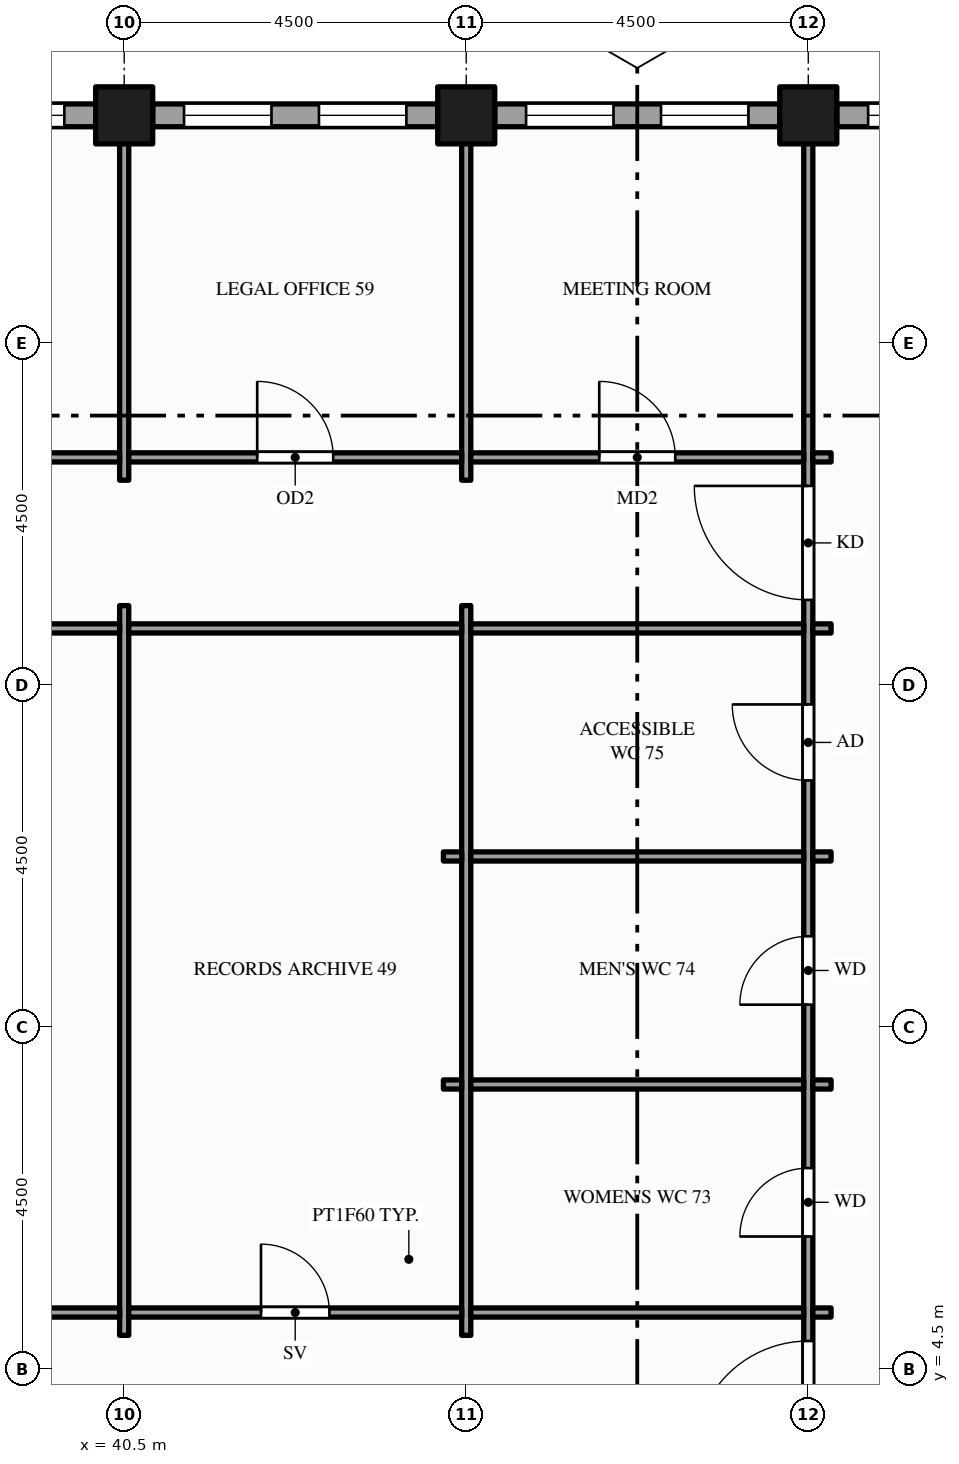
"""IFC4 building model, lengths in metres.
Left out: names, types, materials, properties, quantities, classifications, styles, units other than length and angle.
Written with IfcOpenShell. Run it as: python <this file> out.ifc"""

import sys

from ifc_helpers import new_model, si_unit, direction, frame, frame_2d, origin, origin_2d, place, context, subcontext, project, spatial, rectangle, hollow_rectangle, extrude, element, fill, save


model = new_model("IFC4")
c1 = context("Model", 3, precision=1e-05, world=origin(), true_north=direction((0.0, 1.0)))
c2 = subcontext(c1, "Body", "Model", "MODEL_VIEW")
j1 = project(units=[si_unit("LENGTHUNIT", "METRE"), si_unit("PLANEANGLEUNIT", "RADIAN")], contexts=[c1])
p1 = place(None, origin())
s1 = spatial("IfcSite", under=j1, at=p1, CompositionType="ELEMENT")
p2 = place(p1, origin())
s2 = spatial("IfcBuilding", under=s1, at=p2, CompositionType="ELEMENT")
p3 = place(p2, frame((0.0, 0.0, 199.0)))
s3 = spatial("IfcBuildingStorey", under=s2, at=p3, CompositionType="ELEMENT", Elevation=199.0)
for number, where, z_axis, x_axis in (
    (1, (40.5, 21.0, -0.15), (0.0, 0.0, 1.0), (1.0, 0.0, 0.0)),
    (2, (45.0, 21.0, -0.15), (0.0, 0.0, 1.0), (1.0, 0.0, 0.0)),
    (3, (49.5, 21.0, -0.15), (0.0, 0.0, 1.0), (1.0, 0.0, 0.0)),
):
    element("IfcColumn", number, at=place(p3, frame(where, z_axis=z_axis, x_axis=x_axis)), inside=s3, PredefinedType="COLUMN", context=c2, shape_type="SweptSolid", body=[
        extrude(hollow_rectangle(XDim=0.75, YDim=0.75, WallThickness=0.036, at=origin_2d()), origin(), (0.0, 0.0, 1.0), 4.0),
    ])
p4 = place(p3, frame((54.0, 21.0, 0.0), z_axis=(0.0, 0.0, 1.0), x_axis=(-1.0, 0.0, 0.0)))
e4 = element("IfcWall", 4, at=p4, inside=s3, PredefinedType="STANDARD", context=c2, shape_type="SweptSolid", body=[
    extrude(rectangle(XDim=4.125, YDim=0.3, at=frame_2d((2.062, 0.0))), origin(), (0.0, 0.0, 1.0), 2.87),
])
p5 = place(p4, frame((0.4, 0.0, 0.9)))
e5 = element("IfcOpeningElement", 5, at=p5, cuts=e4, PredefinedType="OPENING", context=c2, shape_type="SweptSolid", body=[
    extrude(rectangle(XDim=1.55, YDim=1.75, at=frame_2d((0.775, 0.875))), frame((0.0, 0.16, 0.0), z_axis=(0.0, -1.0, 0.0), x_axis=(1.0, 0.0, 0.0)), (0.0, 0.0, 1.0), 0.32),
])
p6 = place(p4, frame((2.562, 0.0, 0.9)))
e6 = element("IfcOpeningElement", 6, at=p6, cuts=e4, PredefinedType="OPENING", context=c2, shape_type="SweptSolid", body=[
    extrude(rectangle(XDim=1.15, YDim=1.75, at=frame_2d((0.575, 0.875))), frame((0.0, 0.16, 0.0), z_axis=(0.0, -1.0, 0.0), x_axis=(1.0, 0.0, 0.0)), (0.0, 0.0, 1.0), 0.32),
])
p7 = place(p3, frame((49.125, 21.0, 0.0), z_axis=(0.0, 0.0, 1.0), x_axis=(-1.0, 0.0, 0.0)))
e7 = element("IfcWall", 7, at=p7, inside=s3, PredefinedType="STANDARD", context=c2, shape_type="SweptSolid", body=[
    extrude(rectangle(XDim=3.75, YDim=0.3, at=frame_2d((1.875, 0.0))), origin(), (0.0, 0.0, 1.0), 2.87),
])
p8 = place(p7, frame((0.413, 0.0, 0.9)))
e8 = element("IfcOpeningElement", 8, at=p8, cuts=e7, PredefinedType="OPENING", context=c2, shape_type="SweptSolid", body=[
    extrude(rectangle(XDim=1.15, YDim=1.75, at=frame_2d((0.575, 0.875))), frame((0.0, 0.16, 0.0), z_axis=(0.0, -1.0, 0.0), x_axis=(1.0, 0.0, 0.0)), (0.0, 0.0, 1.0), 0.32),
])
p9 = place(p7, frame((2.188, 0.0, 0.9)))
e9 = element("IfcOpeningElement", 9, at=p9, cuts=e7, PredefinedType="OPENING", context=c2, shape_type="SweptSolid", body=[
    extrude(rectangle(XDim=1.15, YDim=1.75, at=frame_2d((0.575, 0.875))), frame((0.0, 0.16, 0.0), z_axis=(0.0, -1.0, 0.0), x_axis=(1.0, 0.0, 0.0)), (0.0, 0.0, 1.0), 0.32),
])
p10 = place(p3, frame((44.625, 21.0, 0.0), z_axis=(0.0, 0.0, 1.0), x_axis=(-1.0, 0.0, 0.0)))
e10 = element("IfcWall", 10, at=p10, inside=s3, PredefinedType="STANDARD", context=c2, shape_type="SweptSolid", body=[
    extrude(rectangle(XDim=3.75, YDim=0.3, at=frame_2d((1.875, 0.0))), origin(), (0.0, 0.0, 1.0), 2.87),
])
p11 = place(p10, frame((0.413, 0.0, 0.9)))
e11 = element("IfcOpeningElement", 11, at=p11, cuts=e10, PredefinedType="OPENING", context=c2, shape_type="SweptSolid", body=[
    extrude(rectangle(XDim=1.15, YDim=1.75, at=frame_2d((0.575, 0.875))), frame((0.0, 0.16, 0.0), z_axis=(0.0, -1.0, 0.0), x_axis=(1.0, 0.0, 0.0)), (0.0, 0.0, 1.0), 0.32),
])
p12 = place(p10, frame((2.188, 0.0, 0.9)))
e12 = element("IfcOpeningElement", 12, at=p12, cuts=e10, PredefinedType="OPENING", context=c2, shape_type="SweptSolid", body=[
    extrude(rectangle(XDim=1.15, YDim=1.75, at=frame_2d((0.575, 0.875))), frame((0.0, 0.16, 0.0), z_axis=(0.0, -1.0, 0.0), x_axis=(1.0, 0.0, 0.0)), (0.0, 0.0, 1.0), 0.32),
])
p13 = place(p3, frame((40.125, 21.0, 0.0), z_axis=(0.0, 0.0, 1.0), x_axis=(-1.0, 0.0, 0.0)))
e13 = element("IfcWall", 13, at=p13, inside=s3, PredefinedType="STANDARD", context=c2, shape_type="SweptSolid", body=[
    extrude(rectangle(XDim=3.75, YDim=0.3, at=frame_2d((1.875, 0.0))), origin(), (0.0, 0.0, 1.0), 2.87),
])
p14 = place(p13, frame((0.413, 0.0, 0.9)))
e14 = element("IfcOpeningElement", 14, at=p14, cuts=e13, PredefinedType="OPENING", context=c2, shape_type="SweptSolid", body=[
    extrude(rectangle(XDim=1.15, YDim=1.75, at=frame_2d((0.575, 0.875))), frame((0.0, 0.16, 0.0), z_axis=(0.0, -1.0, 0.0), x_axis=(1.0, 0.0, 0.0)), (0.0, 0.0, 1.0), 0.32),
])
p15 = place(p13, frame((2.188, 0.0, 0.9)))
e15 = element("IfcOpeningElement", 15, at=p15, cuts=e13, PredefinedType="OPENING", context=c2, shape_type="SweptSolid", body=[
    extrude(rectangle(XDim=1.15, YDim=1.75, at=frame_2d((0.575, 0.875))), frame((0.0, 0.16, 0.0), z_axis=(0.0, -1.0, 0.0), x_axis=(1.0, 0.0, 0.0)), (0.0, 0.0, 1.0), 0.32),
])
p16 = place(p3, frame((40.5, 4.95, 0.0), z_axis=(0.0, 0.0, 1.0), x_axis=(0.0, 1.0, 0.0)))
e16 = element("IfcWall", 16, at=p16, inside=s3, PredefinedType="PARTITIONING", context=c2, shape_type="SweptSolid", body=[
    extrude(rectangle(XDim=9.6, YDim=0.12, at=frame_2d((4.8, 0.0))), origin(), (0.0, 0.0, 1.0), 2.87),
])
p17 = place(p3, frame((40.5, 16.2, 0.0), z_axis=(0.0, 0.0, 1.0), x_axis=(0.0, 1.0, 0.0)))
e17 = element("IfcWall", 17, at=p17, inside=s3, PredefinedType="PARTITIONING", context=c2, shape_type="SweptSolid", body=[
    extrude(rectangle(XDim=4.65, YDim=0.12, at=frame_2d((2.325, 0.0))), origin(), (0.0, 0.0, 1.0), 2.87),
])
p18 = place(p3, frame((45.0, 4.95, 0.0), z_axis=(0.0, 0.0, 1.0), x_axis=(0.0, 1.0, 0.0)))
e18 = element("IfcWall", 18, at=p18, inside=s3, PredefinedType="PARTITIONING", context=c2, shape_type="SweptSolid", body=[
    extrude(rectangle(XDim=9.6, YDim=0.12, at=frame_2d((4.8, 0.0))), origin(), (0.0, 0.0, 1.0), 2.87),
])
p19 = place(p3, frame((45.0, 16.2, 0.0), z_axis=(0.0, 0.0, 1.0), x_axis=(0.0, 1.0, 0.0)))
e19 = element("IfcWall", 19, at=p19, inside=s3, PredefinedType="PARTITIONING", context=c2, shape_type="SweptSolid", body=[
    extrude(rectangle(XDim=4.65, YDim=0.12, at=frame_2d((2.325, 0.0))), origin(), (0.0, 0.0, 1.0), 2.87),
])
p20 = place(p3, frame((49.5, -1.35, 0.0), z_axis=(0.0, 0.0, 1.0), x_axis=(0.0, 1.0, 0.0)))
e20 = element("IfcWall", 20, at=p20, inside=s3, PredefinedType="PARTITIONING", context=c2, shape_type="SweptSolid", body=[
    extrude(rectangle(XDim=22.2, YDim=0.12, at=frame_2d((11.1, 0.0))), origin(), (0.0, 0.0, 1.0), 2.87),
])
p21 = place(p20, frame((4.725, 0.0, 0.0)))
e21 = element("IfcOpeningElement", 21, at=p21, cuts=e20, PredefinedType="OPENING", context=c2, shape_type="SweptSolid", body=[
    extrude(rectangle(XDim=1.5, YDim=2.1, at=frame_2d((0.75, 1.05))), frame((0.0, 0.07, 0.0), z_axis=(0.0, -1.0, 0.0), x_axis=(1.0, 0.0, 0.0)), (0.0, 0.0, 1.0), 0.14),
])
p22 = place(p20, frame((15.975, 0.0, 0.0)))
e22 = element("IfcOpeningElement", 22, at=p22, cuts=e20, PredefinedType="OPENING", context=c2, shape_type="SweptSolid", body=[
    extrude(rectangle(XDim=1.5, YDim=2.1, at=frame_2d((0.75, 1.05))), frame((0.0, 0.07, 0.0), z_axis=(0.0, -1.0, 0.0), x_axis=(1.0, 0.0, 0.0)), (0.0, 0.0, 1.0), 0.14),
])
p23 = place(p20, frame((7.6, 0.0, 0.0)))
e23 = element("IfcOpeningElement", 23, at=p23, cuts=e20, PredefinedType="OPENING", context=c2, shape_type="SweptSolid", body=[
    extrude(rectangle(XDim=0.9, YDim=2.1, at=frame_2d((0.45, 1.05))), frame((0.0, 0.07, 0.0), z_axis=(0.0, -1.0, 0.0), x_axis=(1.0, 0.0, 0.0)), (0.0, 0.0, 1.0), 0.14),
])
p24 = place(p20, frame((10.65, 0.0, 0.0)))
e24 = element("IfcOpeningElement", 24, at=p24, cuts=e20, PredefinedType="OPENING", context=c2, shape_type="SweptSolid", body=[
    extrude(rectangle(XDim=0.9, YDim=2.1, at=frame_2d((0.45, 1.05))), frame((0.0, 0.07, 0.0), z_axis=(0.0, -1.0, 0.0), x_axis=(1.0, 0.0, 0.0)), (0.0, 0.0, 1.0), 0.14),
])
p25 = place(p20, frame((13.6, 0.0, 0.0)))
e25 = element("IfcOpeningElement", 25, at=p25, cuts=e20, PredefinedType="OPENING", context=c2, shape_type="SweptSolid", body=[
    extrude(rectangle(XDim=1.0, YDim=2.1, at=frame_2d((0.5, 1.05))), frame((0.0, 0.07, 0.0), z_axis=(0.0, -1.0, 0.0), x_axis=(1.0, 0.0, 0.0)), (0.0, 0.0, 1.0), 0.14),
])
p26 = place(p3, frame((36.06, 5.25, 0.0), z_axis=(0.0, 0.0, 1.0), x_axis=(1.0, 0.0, 0.0)))
e26 = element("IfcWall", 26, at=p26, inside=s3, PredefinedType="PARTITIONING", context=c2, shape_type="SweptSolid", body=[
    extrude(rectangle(XDim=4.38, YDim=0.12, at=frame_2d((2.19, 0.0))), origin(), (0.0, 0.0, 1.0), 2.87),
])
p27 = place(p3, frame((40.56, 5.25, 0.0), z_axis=(0.0, 0.0, 1.0), x_axis=(1.0, 0.0, 0.0)))
e27 = element("IfcWall", 27, at=p27, inside=s3, PredefinedType="PARTITIONING", context=c2, shape_type="SweptSolid", body=[
    extrude(rectangle(XDim=4.38, YDim=0.12, at=frame_2d((2.19, 0.0))), origin(), (0.0, 0.0, 1.0), 2.87),
])
p28 = place(p27, frame((1.74, 0.0, 0.0)))
e28 = element("IfcOpeningElement", 28, at=p28, cuts=e27, PredefinedType="OPENING", context=c2, shape_type="SweptSolid", body=[
    extrude(rectangle(XDim=0.9, YDim=2.1, at=frame_2d((0.45, 1.05))), frame((0.0, 0.07, 0.0), z_axis=(0.0, -1.0, 0.0), x_axis=(1.0, 0.0, 0.0)), (0.0, 0.0, 1.0), 0.14),
])
p29 = place(p3, frame((45.06, 5.25, 0.0), z_axis=(0.0, 0.0, 1.0), x_axis=(1.0, 0.0, 0.0)))
e29 = element("IfcWall", 29, at=p29, inside=s3, PredefinedType="PARTITIONING", context=c2, shape_type="SweptSolid", body=[
    extrude(rectangle(XDim=4.38, YDim=0.12, at=frame_2d((2.19, 0.0))), origin(), (0.0, 0.0, 1.0), 2.87),
])
for number, where, z_axis, x_axis in (
    (30, (49.56, 5.25, 0.0), (0.0, 0.0, 1.0), (1.0, 0.0, 0.0)),
    (31, (44.7, 8.25, 0.0), (0.0, 0.0, 1.0), (1.0, 0.0, 0.0)),
):
    element("IfcWall", number, at=place(p3, frame(where, z_axis=z_axis, x_axis=x_axis)), inside=s3, PredefinedType="PARTITIONING", context=c2, shape_type="SweptSolid", body=[
        extrude(rectangle(XDim=0.24, YDim=0.12, at=frame_2d((0.12, 0.0))), origin(), (0.0, 0.0, 1.0), 2.87),
    ])
p30 = place(p3, frame((45.06, 8.25, 0.0), z_axis=(0.0, 0.0, 1.0), x_axis=(1.0, 0.0, 0.0)))
e32 = element("IfcWall", 32, at=p30, inside=s3, PredefinedType="PARTITIONING", context=c2, shape_type="SweptSolid", body=[
    extrude(rectangle(XDim=4.38, YDim=0.12, at=frame_2d((2.19, 0.0))), origin(), (0.0, 0.0, 1.0), 2.87),
])
for number, where, z_axis, x_axis in (
    (33, (49.56, 8.25, 0.0), (0.0, 0.0, 1.0), (1.0, 0.0, 0.0)),
    (34, (44.7, 11.25, 0.0), (0.0, 0.0, 1.0), (1.0, 0.0, 0.0)),
):
    element("IfcWall", number, at=place(p3, frame(where, z_axis=z_axis, x_axis=x_axis)), inside=s3, PredefinedType="PARTITIONING", context=c2, shape_type="SweptSolid", body=[
        extrude(rectangle(XDim=0.24, YDim=0.12, at=frame_2d((0.12, 0.0))), origin(), (0.0, 0.0, 1.0), 2.87),
    ])
p31 = place(p3, frame((45.06, 11.25, 0.0), z_axis=(0.0, 0.0, 1.0), x_axis=(1.0, 0.0, 0.0)))
e35 = element("IfcWall", 35, at=p31, inside=s3, PredefinedType="PARTITIONING", context=c2, shape_type="SweptSolid", body=[
    extrude(rectangle(XDim=4.38, YDim=0.12, at=frame_2d((2.19, 0.0))), origin(), (0.0, 0.0, 1.0), 2.87),
])
p32 = place(p3, frame((49.56, 11.25, 0.0), z_axis=(0.0, 0.0, 1.0), x_axis=(1.0, 0.0, 0.0)))
e36 = element("IfcWall", 36, at=p32, inside=s3, PredefinedType="PARTITIONING", context=c2, shape_type="SweptSolid", body=[
    extrude(rectangle(XDim=0.24, YDim=0.12, at=frame_2d((0.12, 0.0))), origin(), (0.0, 0.0, 1.0), 2.87),
])
p33 = place(p3, frame((36.06, 14.25, 0.0), z_axis=(0.0, 0.0, 1.0), x_axis=(1.0, 0.0, 0.0)))
e37 = element("IfcWall", 37, at=p33, inside=s3, PredefinedType="PARTITIONING", context=c2, shape_type="SweptSolid", body=[
    extrude(rectangle(XDim=4.38, YDim=0.12, at=frame_2d((2.19, 0.0))), origin(), (0.0, 0.0, 1.0), 2.87),
])
p34 = place(p33, frame((1.59, 0.0, 0.0)))
e38 = element("IfcOpeningElement", 38, at=p34, cuts=e37, PredefinedType="OPENING", context=c2, shape_type="SweptSolid", body=[
    extrude(rectangle(XDim=1.2, YDim=2.1, at=frame_2d((0.6, 1.05))), frame((0.0, 0.07, 0.0), z_axis=(0.0, -1.0, 0.0), x_axis=(1.0, 0.0, 0.0)), (0.0, 0.0, 1.0), 0.14),
])
for number, where, z_axis, x_axis in (
    (39, (40.56, 14.25, 0.0), (0.0, 0.0, 1.0), (1.0, 0.0, 0.0)),
    (40, (45.06, 14.25, 0.0), (0.0, 0.0, 1.0), (1.0, 0.0, 0.0)),
):
    element("IfcWall", number, at=place(p3, frame(where, z_axis=z_axis, x_axis=x_axis)), inside=s3, PredefinedType="PARTITIONING", context=c2, shape_type="SweptSolid", body=[
        extrude(rectangle(XDim=4.38, YDim=0.12, at=frame_2d((2.19, 0.0))), origin(), (0.0, 0.0, 1.0), 2.87),
    ])
p35 = place(p3, frame((49.56, 14.25, 0.0), z_axis=(0.0, 0.0, 1.0), x_axis=(1.0, 0.0, 0.0)))
e41 = element("IfcWall", 41, at=p35, inside=s3, PredefinedType="PARTITIONING", context=c2, shape_type="SweptSolid", body=[
    extrude(rectangle(XDim=0.24, YDim=0.12, at=frame_2d((0.12, 0.0))), origin(), (0.0, 0.0, 1.0), 2.87),
])
p36 = place(p3, frame((33.81, 16.5, 0.0), z_axis=(0.0, 0.0, 1.0), x_axis=(1.0, 0.0, 0.0)))
e42 = element("IfcWall", 42, at=p36, inside=s3, PredefinedType="PARTITIONING", context=c2, shape_type="SweptSolid", body=[
    extrude(rectangle(XDim=6.63, YDim=0.12, at=frame_2d((3.315, 0.0))), origin(), (0.0, 0.0, 1.0), 2.87),
])
p37 = place(p36, frame((2.815, 0.0, 0.0)))
e43 = element("IfcOpeningElement", 43, at=p37, cuts=e42, PredefinedType="OPENING", context=c2, shape_type="SweptSolid", body=[
    extrude(rectangle(XDim=1.0, YDim=2.1, at=frame_2d((0.5, 1.05))), frame((0.0, 0.07, 0.0), z_axis=(0.0, -1.0, 0.0), x_axis=(1.0, 0.0, 0.0)), (0.0, 0.0, 1.0), 0.14),
])
p38 = place(p3, frame((40.56, 16.5, 0.0), z_axis=(0.0, 0.0, 1.0), x_axis=(1.0, 0.0, 0.0)))
e44 = element("IfcWall", 44, at=p38, inside=s3, PredefinedType="PARTITIONING", context=c2, shape_type="SweptSolid", body=[
    extrude(rectangle(XDim=4.38, YDim=0.12, at=frame_2d((2.19, 0.0))), origin(), (0.0, 0.0, 1.0), 2.87),
])
p39 = place(p38, frame((1.69, 0.0, 0.0)))
e45 = element("IfcOpeningElement", 45, at=p39, cuts=e44, PredefinedType="OPENING", context=c2, shape_type="SweptSolid", body=[
    extrude(rectangle(XDim=1.0, YDim=2.1, at=frame_2d((0.5, 1.05))), frame((0.0, 0.07, 0.0), z_axis=(0.0, -1.0, 0.0), x_axis=(1.0, 0.0, 0.0)), (0.0, 0.0, 1.0), 0.14),
])
p40 = place(p3, frame((45.06, 16.5, 0.0), z_axis=(0.0, 0.0, 1.0), x_axis=(1.0, 0.0, 0.0)))
e46 = element("IfcWall", 46, at=p40, inside=s3, PredefinedType="PARTITIONING", context=c2, shape_type="SweptSolid", body=[
    extrude(rectangle(XDim=4.38, YDim=0.12, at=frame_2d((2.19, 0.0))), origin(), (0.0, 0.0, 1.0), 2.87),
])
p41 = place(p40, frame((1.69, 0.0, 0.0)))
e47 = element("IfcOpeningElement", 47, at=p41, cuts=e46, PredefinedType="OPENING", context=c2, shape_type="SweptSolid", body=[
    extrude(rectangle(XDim=1.0, YDim=2.1, at=frame_2d((0.5, 1.05))), frame((0.0, 0.07, 0.0), z_axis=(0.0, -1.0, 0.0), x_axis=(1.0, 0.0, 0.0)), (0.0, 0.0, 1.0), 0.14),
])
p42 = place(p3, frame((49.56, 16.5, 0.0), z_axis=(0.0, 0.0, 1.0), x_axis=(1.0, 0.0, 0.0)))
e48 = element("IfcWall", 48, at=p42, inside=s3, PredefinedType="PARTITIONING", context=c2, shape_type="SweptSolid", body=[
    extrude(rectangle(XDim=0.24, YDim=0.12, at=frame_2d((0.12, 0.0))), origin(), (0.0, 0.0, 1.0), 2.87),
])
p43 = place(p6, origin())
e49 = element("IfcWindow", 49, at=p43, inside=s3, PartitioningType="SINGLE_PANEL", PredefinedType="WINDOW", context=c2, shape_type="SweptSolid", body=[
    extrude(rectangle(XDim=1.15, YDim=1.75, at=frame_2d((0.575, 0.875))), frame((0.0, 0.03, 0.0), z_axis=(0.0, -1.0, 0.0), x_axis=(1.0, 0.0, 0.0)), (0.0, 0.0, 1.0), 0.06),
])
fill(e6, e49)
p44 = place(p8, origin())
e50 = element("IfcWindow", 50, at=p44, inside=s3, PartitioningType="SINGLE_PANEL", PredefinedType="WINDOW", context=c2, shape_type="SweptSolid", body=[
    extrude(rectangle(XDim=1.15, YDim=1.75, at=frame_2d((0.575, 0.875))), frame((0.0, 0.03, 0.0), z_axis=(0.0, -1.0, 0.0), x_axis=(1.0, 0.0, 0.0)), (0.0, 0.0, 1.0), 0.06),
])
fill(e8, e50)
p45 = place(p9, origin())
e51 = element("IfcWindow", 51, at=p45, inside=s3, PartitioningType="SINGLE_PANEL", PredefinedType="WINDOW", context=c2, shape_type="SweptSolid", body=[
    extrude(rectangle(XDim=1.15, YDim=1.75, at=frame_2d((0.575, 0.875))), frame((0.0, 0.03, 0.0), z_axis=(0.0, -1.0, 0.0), x_axis=(1.0, 0.0, 0.0)), (0.0, 0.0, 1.0), 0.06),
])
fill(e9, e51)
p46 = place(p11, origin())
e52 = element("IfcWindow", 52, at=p46, inside=s3, PartitioningType="SINGLE_PANEL", PredefinedType="WINDOW", context=c2, shape_type="SweptSolid", body=[
    extrude(rectangle(XDim=1.15, YDim=1.75, at=frame_2d((0.575, 0.875))), frame((0.0, 0.03, 0.0), z_axis=(0.0, -1.0, 0.0), x_axis=(1.0, 0.0, 0.0)), (0.0, 0.0, 1.0), 0.06),
])
fill(e11, e52)
p47 = place(p12, origin())
e53 = element("IfcWindow", 53, at=p47, inside=s3, PartitioningType="SINGLE_PANEL", PredefinedType="WINDOW", context=c2, shape_type="SweptSolid", body=[
    extrude(rectangle(XDim=1.15, YDim=1.75, at=frame_2d((0.575, 0.875))), frame((0.0, 0.03, 0.0), z_axis=(0.0, -1.0, 0.0), x_axis=(1.0, 0.0, 0.0)), (0.0, 0.0, 1.0), 0.06),
])
fill(e12, e53)
p48 = place(p14, origin())
e54 = element("IfcWindow", 54, at=p48, inside=s3, PartitioningType="SINGLE_PANEL", PredefinedType="WINDOW", context=c2, shape_type="SweptSolid", body=[
    extrude(rectangle(XDim=1.15, YDim=1.75, at=frame_2d((0.575, 0.875))), frame((0.0, 0.03, 0.0), z_axis=(0.0, -1.0, 0.0), x_axis=(1.0, 0.0, 0.0)), (0.0, 0.0, 1.0), 0.06),
])
fill(e14, e54)
p49 = place(p21, origin())
e55 = element("IfcDoor", 55, at=p49, inside=s3, OperationType="SINGLE_SWING_LEFT", PredefinedType="DOOR", context=c2, shape_type="SweptSolid", body=[
    extrude(rectangle(XDim=1.5, YDim=2.1, at=frame_2d((0.75, 1.05))), frame((0.0, 0.025, 0.0), z_axis=(0.0, -1.0, 0.0), x_axis=(1.0, 0.0, 0.0)), (0.0, 0.0, 1.0), 0.05),
])
fill(e21, e55)
p50 = place(p22, origin())
e56 = element("IfcDoor", 56, at=p50, inside=s3, OperationType="SINGLE_SWING_RIGHT", PredefinedType="DOOR", context=c2, shape_type="SweptSolid", body=[
    extrude(rectangle(XDim=1.5, YDim=2.1, at=frame_2d((0.75, 1.05))), frame((0.0, 0.025, 0.0), z_axis=(0.0, -1.0, 0.0), x_axis=(1.0, 0.0, 0.0)), (0.0, 0.0, 1.0), 0.05),
])
fill(e22, e56)
p51 = place(p28, origin())
e57 = element("IfcDoor", 57, at=p51, inside=s3, OperationType="SINGLE_SWING_LEFT", PredefinedType="DOOR", context=c2, shape_type="SweptSolid", body=[
    extrude(rectangle(XDim=0.9, YDim=2.1, at=frame_2d((0.45, 1.05))), frame((0.0, 0.025, 0.0), z_axis=(0.0, -1.0, 0.0), x_axis=(1.0, 0.0, 0.0)), (0.0, 0.0, 1.0), 0.05),
])
fill(e28, e57)
p52 = place(p23, origin())
e58 = element("IfcDoor", 58, at=p52, inside=s3, OperationType="SINGLE_SWING_LEFT", PredefinedType="DOOR", context=c2, shape_type="SweptSolid", body=[
    extrude(rectangle(XDim=0.9, YDim=2.1, at=frame_2d((0.45, 1.05))), frame((0.0, 0.025, 0.0), z_axis=(0.0, -1.0, 0.0), x_axis=(1.0, 0.0, 0.0)), (0.0, 0.0, 1.0), 0.05),
])
fill(e23, e58)
p53 = place(p24, origin())
e59 = element("IfcDoor", 59, at=p53, inside=s3, OperationType="SINGLE_SWING_LEFT", PredefinedType="DOOR", context=c2, shape_type="SweptSolid", body=[
    extrude(rectangle(XDim=0.9, YDim=2.1, at=frame_2d((0.45, 1.05))), frame((0.0, 0.025, 0.0), z_axis=(0.0, -1.0, 0.0), x_axis=(1.0, 0.0, 0.0)), (0.0, 0.0, 1.0), 0.05),
])
fill(e24, e59)
p54 = place(p25, origin())
e60 = element("IfcDoor", 60, at=p54, inside=s3, OperationType="SINGLE_SWING_RIGHT", PredefinedType="DOOR", context=c2, shape_type="SweptSolid", body=[
    extrude(rectangle(XDim=1.0, YDim=2.1, at=frame_2d((0.5, 1.05))), frame((0.0, 0.025, 0.0), z_axis=(0.0, -1.0, 0.0), x_axis=(1.0, 0.0, 0.0)), (0.0, 0.0, 1.0), 0.05),
])
fill(e25, e60)
p55 = place(p39, origin())
e61 = element("IfcDoor", 61, at=p55, inside=s3, OperationType="SINGLE_SWING_LEFT", PredefinedType="DOOR", context=c2, shape_type="SweptSolid", body=[
    extrude(rectangle(XDim=1.0, YDim=2.1, at=frame_2d((0.5, 1.05))), frame((0.0, 0.025, 0.0), z_axis=(0.0, -1.0, 0.0), x_axis=(1.0, 0.0, 0.0)), (0.0, 0.0, 1.0), 0.05),
])
fill(e45, e61)
p56 = place(p41, origin())
e62 = element("IfcDoor", 62, at=p56, inside=s3, OperationType="SINGLE_SWING_LEFT", PredefinedType="DOOR", context=c2, shape_type="SweptSolid", body=[
    extrude(rectangle(XDim=1.0, YDim=2.1, at=frame_2d((0.5, 1.05))), frame((0.0, 0.025, 0.0), z_axis=(0.0, -1.0, 0.0), x_axis=(1.0, 0.0, 0.0)), (0.0, 0.0, 1.0), 0.05),
])
fill(e47, e62)
save(model, sys.argv[1])
